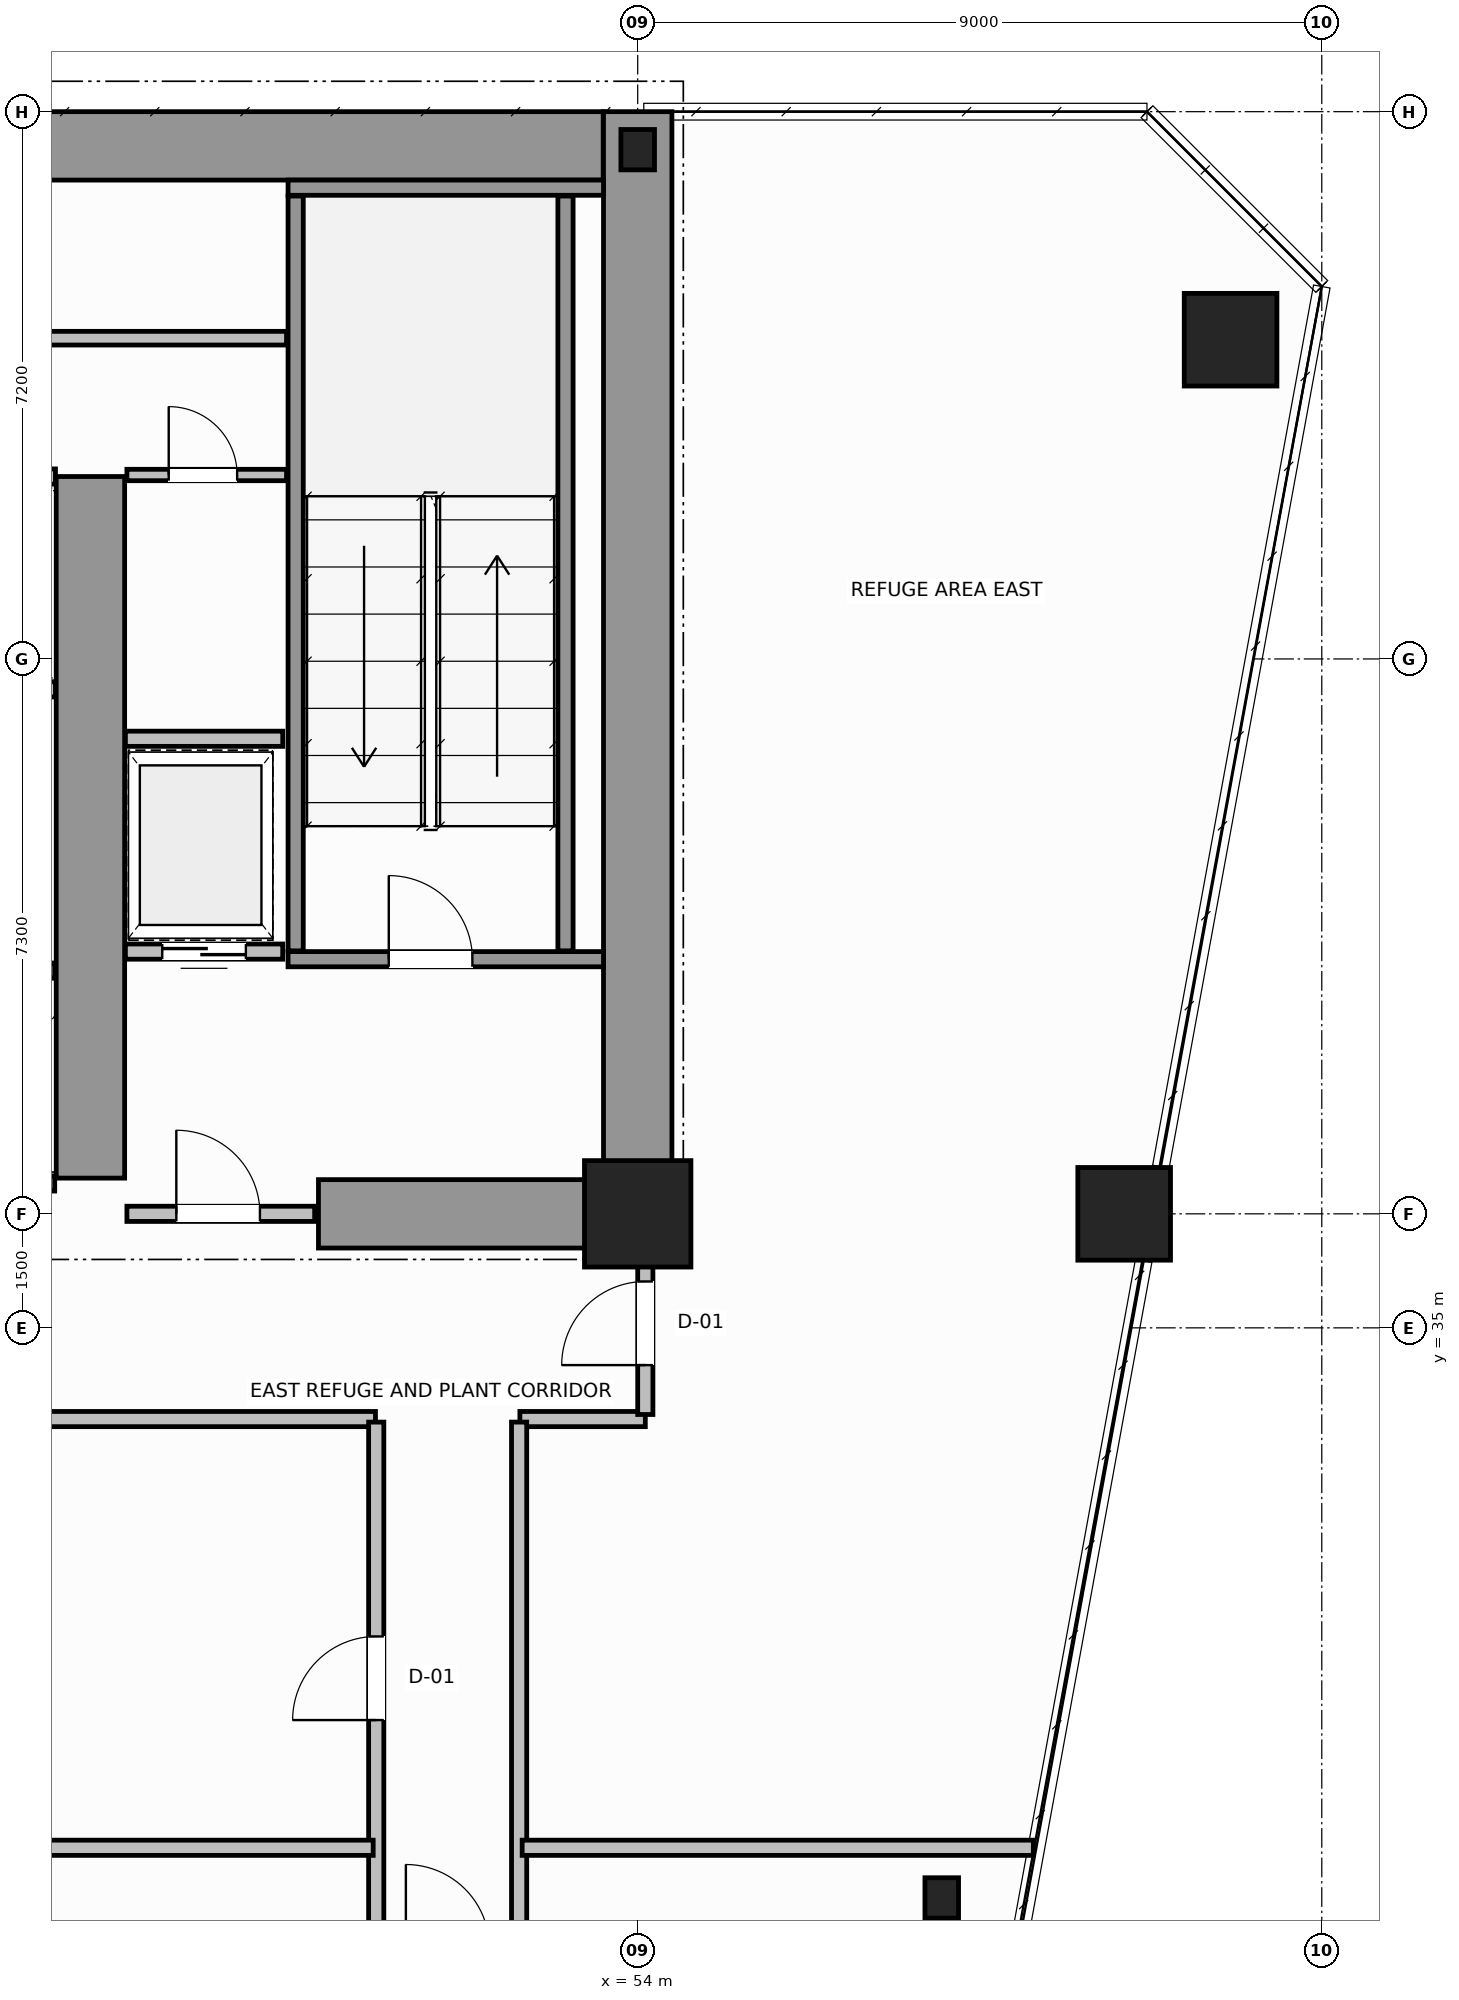
"""IFC4 building model, lengths in metres.
Left out: names, types, materials, properties, quantities, classifications, styles, units other than length and angle.
Written with IfcOpenShell. Run it as: python <this file> out.ifc"""

import sys

from ifc_helpers import new_model, si_unit, direction, frame, frame_2d, origin, origin_2d, place, context, subcontext, project, spatial, rectangle, hollow_circle, i_section, extrude, source, transform, mapped, element, fill, save


model = new_model("IFC4")
c1 = context("Model", 3, precision=1e-05, world=origin(), true_north=direction((0.0, 1.0)))
c2 = subcontext(c1, "Body", "Model", "MODEL_VIEW")
j1 = project(units=[si_unit("LENGTHUNIT", "METRE"), si_unit("PLANEANGLEUNIT", "RADIAN")], contexts=[c1])
p1 = place(None, origin())
s1 = spatial("IfcSite", under=j1, at=p1, CompositionType="ELEMENT")
p2 = place(p1, origin())
s2 = spatial("IfcBuilding", under=s1, at=p2, CompositionType="ELEMENT")
p3 = place(p2, frame((0.0, 0.0, 83.4)))
s3 = spatial("IfcBuildingStorey", under=s2, at=p3, CompositionType="ELEMENT", Elevation=83.4)
m1 = source(origin(), c2, "Body", "SweptSolid", [
    extrude(rectangle(XDim=1.4, YDim=1.4, at=origin_2d()), origin(), (0.0, 0.0, 1.0), 4.8),
])
p4 = place(p3, frame((54.0, 36.5, 0.0), z_axis=(0.0, 0.0, 1.0), x_axis=(1.0, 0.0, 0.0)))
e1 = element("IfcColumn", 1, at=p4, inside=s3, PredefinedType="COLUMN", context=c2, shape_type="MappedRepresentation", body=[
    mapped(m1, transform((0.0, 0.0, 0.0), scale=1.0)),
])
m2 = source(origin(), c2, "Body", "SweptSolid", [
    extrude(i_section(OverallWidth=0.442, OverallDepth=0.531, WebThickness=0.065, FlangeThickness=0.076, FilletRadius=0.015, at=origin_2d()), origin(), (0.0, 0.0, 1.0), 4.8),
])
p5 = place(p3, frame((54.0, 50.5, 0.0), z_axis=(0.0, 0.0, 1.0), x_axis=(1.0, 0.0, 0.0)))
e2 = element("IfcColumn", 2, at=p5, inside=s3, PredefinedType="COLUMN", context=c2, shape_type="MappedRepresentation", body=[
    mapped(m2, transform((0.0, 0.0, 0.0), scale=1.0)),
])
m3 = source(origin(), c2, "Body", "SweptSolid", [
    extrude(hollow_circle(Radius=0.61, WallThickness=0.05, at=origin_2d()), origin(), (0.0, 0.0, 1.0), 4.8),
])
for number, where, z_axis, x_axis in (
    (3, (61.8, 48.0, 0.0), (0.0, 0.0, 1.0), (1.0, 0.0, 0.0)),
    (4, (60.4, 36.5, 0.0), (0.0, 0.0, 1.0), (1.0, 0.0, 0.0)),
):
    element("IfcColumn", number, at=place(p3, frame(where, z_axis=z_axis, x_axis=x_axis)), inside=s3, PredefinedType="COLUMN", context=c2, shape_type="MappedRepresentation", body=[
        mapped(m3, transform((0.0, 0.0, 0.0), scale=1.0)),
    ])
m4 = source(origin(), c2, "Body", "SweptSolid", [
    extrude(i_section(OverallWidth=0.442, OverallDepth=0.531, WebThickness=0.065, FlangeThickness=0.076, FilletRadius=0.015, at=origin_2d()), origin(), (0.0, 0.0, 1.0), 4.8),
])
p6 = place(p3, frame((58.0, 27.5, 0.0), z_axis=(0.0, 0.0, 1.0), x_axis=(1.0, 0.0, 0.0)))
e5 = element("IfcColumn", 5, at=p6, inside=s3, PredefinedType="COLUMN", context=c2, shape_type="MappedRepresentation", body=[
    mapped(m4, transform((0.0, 0.0, 0.0), scale=1.0)),
])
p7 = place(p3, frame((34.002, 50.55, 0.0), z_axis=(0.0, 0.0, 1.0), x_axis=(1.0, 0.0, 0.0)))
e6 = element("IfcWall", 6, at=p7, inside=s3, PredefinedType="SHEAR", context=c2, shape_type="SweptSolid", body=[
    extrude(rectangle(XDim=19.544, YDim=0.9, at=frame_2d((9.772, 0.0))), origin(), (0.0, 0.0, 1.0), 4.8),
])
p8 = place(p3, frame((54.0, 36.5, 0.0), z_axis=(0.0, 0.0, 1.0), x_axis=(0.0, 1.0, 0.0)))
e7 = element("IfcWall", 7, at=p8, inside=s3, PredefinedType="SHEAR", context=c2, shape_type="SweptSolid", body=[
    extrude(rectangle(XDim=14.5, YDim=0.9, at=frame_2d((7.25, 0.0))), origin(), (0.0, 0.0, 1.0), 4.8),
])
p9 = place(p3, frame((49.8, 36.5, 0.0), z_axis=(0.0, 0.0, 1.0), x_axis=(1.0, 0.0, 0.0)))
e8 = element("IfcWall", 8, at=p9, inside=s3, PredefinedType="SHEAR", context=c2, shape_type="SweptSolid", body=[
    extrude(rectangle(XDim=3.73, YDim=0.9, at=frame_2d((1.865, 0.0))), origin(), (0.0, 0.0, 1.0), 3.34),
])
p10 = place(p3, frame((46.8, 36.97, 0.0), z_axis=(0.0, 0.0, 1.0), x_axis=(0.0, 1.0, 0.0)))
e9 = element("IfcWall", 9, at=p10, inside=s3, PredefinedType="SHEAR", context=c2, shape_type="SweptSolid", body=[
    extrude(rectangle(XDim=9.23, YDim=0.9, at=frame_2d((4.615, 0.0))), origin(), (0.0, 0.0, 1.0), 4.8),
])
p11 = place(p3, frame((49.4, 39.85, 0.0), z_axis=(0.0, 0.0, 1.0), x_axis=(1.0, 0.0, 0.0)))
e10 = element("IfcWall", 10, at=p11, inside=s3, PredefinedType="SOLIDWALL", context=c2, shape_type="SweptSolid", body=[
    extrude(rectangle(XDim=4.15, YDim=0.2, at=frame_2d((2.075, 0.0))), origin(), (0.0, 0.0, 1.0), 4.8),
])
p12 = place(p11, frame((1.325, 0.0, 0.0)))
e11 = element("IfcOpeningElement", 11, at=p12, cuts=e10, PredefinedType="OPENING", context=c2, shape_type="SweptSolid", body=[
    extrude(rectangle(XDim=1.1, YDim=2.15, at=frame_2d((0.55, 1.075))), frame((0.0, 0.11, 0.0), z_axis=(0.0, -1.0, 0.0), x_axis=(1.0, 0.0, 0.0)), (0.0, 0.0, 1.0), 0.22),
])
p13 = place(p3, frame((49.4, 50.0, 0.0), z_axis=(0.0, 0.0, 1.0), x_axis=(1.0, 0.0, 0.0)))
e12 = element("IfcWall", 12, at=p13, inside=s3, PredefinedType="SOLIDWALL", context=c2, shape_type="SweptSolid", body=[
    extrude(rectangle(XDim=4.15, YDim=0.2, at=frame_2d((2.075, 0.0))), origin(), (0.0, 0.0, 1.0), 4.8),
])
for number, where, z_axis, x_axis in (
    (13, (49.5, 39.96, 0.0), (0.0, 0.0, 1.0), (0.0, 1.0, 0.0)),
    (14, (53.05, 39.96, 0.0), (0.0, 0.0, 1.0), (0.0, 1.0, 0.0)),
):
    element("IfcWall", number, at=place(p3, frame(where, z_axis=z_axis, x_axis=x_axis)), inside=s3, PredefinedType="SOLIDWALL", context=c2, shape_type="SweptSolid", body=[
        extrude(rectangle(XDim=9.93, YDim=0.2, at=frame_2d((4.965, 0.0))), origin(), (0.0, 0.0, 1.0), 4.8),
    ])
p14 = place(p3, frame((47.28, 36.5, 0.0), z_axis=(0.0, 0.0, 1.0), x_axis=(1.0, 0.0, 0.0)))
e15 = element("IfcWall", 15, at=p14, inside=s3, PredefinedType="SOLIDWALL", context=c2, shape_type="SweptSolid", body=[
    extrude(rectangle(XDim=2.47, YDim=0.2, at=frame_2d((1.235, 0.0))), origin(), (0.0, 0.0, 1.0), 3.33),
])
p15 = place(p14, frame((0.65, 0.0, 0.0)))
e16 = element("IfcOpeningElement", 16, at=p15, cuts=e15, PredefinedType="OPENING", context=c2, shape_type="SweptSolid", body=[
    extrude(rectangle(XDim=1.1, YDim=2.15, at=frame_2d((0.55, 1.075))), frame((0.0, 0.11, 0.0), z_axis=(0.0, -1.0, 0.0), x_axis=(1.0, 0.0, 0.0)), (0.0, 0.0, 1.0), 0.22),
])
p16 = place(p3, frame((44.37, 39.7, 0.0), z_axis=(0.0, 0.0, 1.0), x_axis=(1.0, 0.0, 0.0)))
e17 = element("IfcWall", 17, at=p16, inside=s3, PredefinedType="SOLIDWALL", context=c2, shape_type="SweptSolid", body=[
    extrude(rectangle(XDim=1.96, YDim=0.2, at=frame_2d((0.98, 0.0))), origin(), (0.0, 0.0, 1.0), 4.54),
])
p17 = place(p3, frame((44.37, 36.9, 0.0), z_axis=(0.0, 0.0, 1.0), x_axis=(1.0, 0.0, 0.0)))
e18 = element("IfcWall", 18, at=p17, inside=s3, PredefinedType="SOLIDWALL", context=c2, shape_type="SweptSolid", body=[
    extrude(rectangle(XDim=1.96, YDim=0.2, at=frame_2d((0.98, 0.0))), origin(), (0.0, 0.0, 1.0), 3.33),
])
for number, where, z_axis, x_axis in (
    (19, (44.62, 43.4, 0.0), (0.0, 0.0, 1.0), (1.0, 0.0, 0.0)),
    (20, (44.62, 46.2, 0.0), (0.0, 0.0, 1.0), (1.0, 0.0, 0.0)),
):
    element("IfcWall", number, at=place(p3, frame(where, z_axis=z_axis, x_axis=x_axis)), inside=s3, PredefinedType="SOLIDWALL", context=c2, shape_type="SweptSolid", body=[
        extrude(rectangle(XDim=1.72, YDim=0.2, at=frame_2d((0.86, 0.0))), origin(), (0.0, 0.0, 1.0), 4.54),
    ])
p18 = place(p3, frame((47.26, 39.95, 0.0), z_axis=(0.0, 0.0, 1.0), x_axis=(1.0, 0.0, 0.0)))
e21 = element("IfcWall", 21, at=p18, inside=s3, PredefinedType="SOLIDWALL", context=c2, shape_type="SweptSolid", body=[
    extrude(rectangle(XDim=2.07, YDim=0.2, at=frame_2d((1.035, 0.0))), origin(), (0.0, 0.0, 1.0), 4.54),
])
p19 = place(p18, frame((0.485, 0.0, 0.0)))
e22 = element("IfcOpeningElement", 22, at=p19, cuts=e21, PredefinedType="OPENING", context=c2, shape_type="SweptSolid", body=[
    extrude(rectangle(XDim=1.1, YDim=2.15, at=frame_2d((0.55, 1.075))), frame((0.0, 0.11, 0.0), z_axis=(0.0, -1.0, 0.0), x_axis=(1.0, 0.0, 0.0)), (0.0, 0.0, 1.0), 0.22),
])
p20 = place(p3, frame((47.26, 42.75, 0.0), z_axis=(0.0, 0.0, 1.0), x_axis=(1.0, 0.0, 0.0)))
e23 = element("IfcWall", 23, at=p20, inside=s3, PredefinedType="SOLIDWALL", context=c2, shape_type="SweptSolid", body=[
    extrude(rectangle(XDim=2.07, YDim=0.2, at=frame_2d((1.035, 0.0))), origin(), (0.0, 0.0, 1.0), 4.54),
])
p21 = place(p3, frame((47.28, 46.22, 0.0), z_axis=(0.0, 0.0, 1.0), x_axis=(1.0, 0.0, 0.0)))
e24 = element("IfcWall", 24, at=p21, inside=s3, PredefinedType="PARTITIONING", context=c2, shape_type="SweptSolid", body=[
    extrude(rectangle(XDim=2.1, YDim=0.15, at=frame_2d((1.05, 0.0))), origin(), (0.0, 0.0, 1.0), 4.54),
])
p22 = place(p21, frame((0.55, 0.0, 0.0)))
e25 = element("IfcOpeningElement", 25, at=p22, cuts=e24, PredefinedType="OPENING", context=c2, shape_type="SweptSolid", body=[
    extrude(rectangle(XDim=0.9, YDim=2.1, at=frame_2d((0.45, 1.05))), frame((0.0, 0.085, 0.0), z_axis=(0.0, -1.0, 0.0), x_axis=(1.0, 0.0, 0.0)), (0.0, 0.0, 1.0), 0.17),
])
p23 = place(p3, frame((18.62, 48.02, 0.0), z_axis=(0.0, 0.0, 1.0), x_axis=(1.0, 0.0, 0.0)))
e26 = element("IfcWall", 26, at=p23, inside=s3, PredefinedType="PLUMBINGWALL", context=c2, shape_type="SweptSolid", body=[
    extrude(rectangle(XDim=30.76, YDim=0.18, at=frame_2d((15.38, 0.0))), origin(), (0.0, 0.0, 1.0), 4.54),
])
p24 = place(p23, frame((1.955, 0.0, 0.0)))
e27 = element("IfcOpeningElement", 27, at=p24, cuts=e26, PredefinedType="OPENING", context=c2, shape_type="SweptSolid", body=[
    extrude(rectangle(XDim=0.9, YDim=2.15, at=frame_2d((0.45, 1.075))), frame((0.0, 0.1, 0.0), z_axis=(0.0, -1.0, 0.0), x_axis=(1.0, 0.0, 0.0)), (0.0, 0.0, 1.0), 0.2),
])
p25 = place(p23, frame((8.03, 0.0, 0.0)))
e28 = element("IfcOpeningElement", 28, at=p25, cuts=e26, PredefinedType="OPENING", context=c2, shape_type="SweptSolid", body=[
    extrude(rectangle(XDim=0.9, YDim=2.15, at=frame_2d((0.45, 1.075))), frame((0.0, 0.1, 0.0), z_axis=(0.0, -1.0, 0.0), x_axis=(1.0, 0.0, 0.0)), (0.0, 0.0, 1.0), 0.2),
])
p26 = place(p23, frame((16.93, 0.0, 0.0)))
e29 = element("IfcOpeningElement", 29, at=p26, cuts=e26, PredefinedType="OPENING", context=c2, shape_type="SweptSolid", body=[
    extrude(rectangle(XDim=0.9, YDim=2.15, at=frame_2d((0.45, 1.075))), frame((0.0, 0.1, 0.0), z_axis=(0.0, -1.0, 0.0), x_axis=(1.0, 0.0, 0.0)), (0.0, 0.0, 1.0), 0.2),
])
p27 = place(p23, frame((26.205, 0.0, 0.0)))
e30 = element("IfcOpeningElement", 30, at=p27, cuts=e26, PredefinedType="OPENING", context=c2, shape_type="SweptSolid", body=[
    extrude(rectangle(XDim=0.9, YDim=2.15, at=frame_2d((0.45, 1.075))), frame((0.0, 0.1, 0.0), z_axis=(0.0, -1.0, 0.0), x_axis=(1.0, 0.0, 0.0)), (0.0, 0.0, 1.0), 0.2),
])
p28 = place(p3, frame((39.64, 33.8, 0.0), z_axis=(0.0, 0.0, 1.0), x_axis=(1.0, 0.0, 0.0)))
e31 = element("IfcWall", 31, at=p28, inside=s3, PredefinedType="SOLIDWALL", context=c2, shape_type="SweptSolid", body=[
    extrude(rectangle(XDim=10.91, YDim=0.2, at=frame_2d((5.455, 0.0))), origin(), (0.0, 0.0, 1.0), 4.03),
])
p29 = place(p28, frame((1.8, 0.0, 0.0)))
e32 = element("IfcOpeningElement", 32, at=p29, cuts=e31, PredefinedType="OPENING", context=c2, shape_type="SweptSolid", body=[
    extrude(rectangle(XDim=1.1, YDim=2.15, at=frame_2d((0.55, 1.075))), frame((0.0, 0.11, 0.0), z_axis=(0.0, -1.0, 0.0), x_axis=(1.0, 0.0, 0.0)), (0.0, 0.0, 1.0), 0.22),
])
p30 = place(p3, frame((52.45, 33.8, 0.0), z_axis=(0.0, 0.0, 1.0), x_axis=(1.0, 0.0, 0.0)))
e33 = element("IfcWall", 33, at=p30, inside=s3, PredefinedType="SOLIDWALL", context=c2, shape_type="SweptSolid", body=[
    extrude(rectangle(XDim=1.65, YDim=0.2, at=frame_2d((0.825, 0.0))), origin(), (0.0, 0.0, 1.0), 4.03),
])
p31 = place(p3, frame((54.1, 33.86, 0.0), z_axis=(0.0, 0.0, 1.0), x_axis=(0.0, 1.0, 0.0)))
e34 = element("IfcWall", 34, at=p31, inside=s3, PredefinedType="SOLIDWALL", context=c2, shape_type="SweptSolid", body=[
    extrude(rectangle(XDim=2.58, YDim=0.2, at=frame_2d((1.29, 0.0))), origin(), (0.0, 0.0, 1.0), 4.54),
])
p32 = place(p31, frame((0.65, 0.0, 0.0)))
e35 = element("IfcOpeningElement", 35, at=p32, cuts=e34, PredefinedType="OPENING", context=c2, shape_type="SweptSolid", body=[
    extrude(rectangle(XDim=1.1, YDim=2.15, at=frame_2d((0.55, 1.075))), frame((0.0, 0.11, 0.0), z_axis=(0.0, -1.0, 0.0), x_axis=(1.0, 0.0, 0.0)), (0.0, 0.0, 1.0), 0.22),
])
p33 = place(p3, frame((50.56, 26.84, 0.0), z_axis=(0.0, 0.0, 1.0), x_axis=(0.0, 1.0, 0.0)))
e36 = element("IfcWall", 36, at=p33, inside=s3, PredefinedType="SOLIDWALL", context=c2, shape_type="SweptSolid", body=[
    extrude(rectangle(XDim=6.92, YDim=0.2, at=frame_2d((3.46, 0.0))), origin(), (0.0, 0.0, 1.0), 4.54),
])
p34 = place(p33, frame((3.0, 0.0, 0.0)))
e37 = element("IfcOpeningElement", 37, at=p34, cuts=e36, PredefinedType="OPENING", context=c2, shape_type="SweptSolid", body=[
    extrude(rectangle(XDim=1.1, YDim=2.15, at=frame_2d((0.55, 1.075))), frame((0.0, 0.11, 0.0), z_axis=(0.0, -1.0, 0.0), x_axis=(1.0, 0.0, 0.0)), (0.0, 0.0, 1.0), 0.22),
])
p35 = place(p3, frame((52.44, 26.84, 0.0), z_axis=(0.0, 0.0, 1.0), x_axis=(0.0, 1.0, 0.0)))
e38 = element("IfcWall", 38, at=p35, inside=s3, PredefinedType="SOLIDWALL", context=c2, shape_type="SweptSolid", body=[
    extrude(rectangle(XDim=6.92, YDim=0.2, at=frame_2d((3.46, 0.0))), origin(), (0.0, 0.0, 1.0), 4.54),
])
p36 = place(p3, frame((17.48, 28.16, 0.0), z_axis=(0.0, 0.0, 1.0), x_axis=(1.0, 0.0, 0.0)))
e39 = element("IfcWall", 39, at=p36, inside=s3, PredefinedType="SOLIDWALL", context=c2, shape_type="SweptSolid", body=[
    extrude(rectangle(XDim=33.04, YDim=0.2, at=frame_2d((16.52, 0.0))), origin(), (0.0, 0.0, 1.0), 4.54),
])
p37 = place(p3, frame((52.48, 28.16, 0.0), z_axis=(0.0, 0.0, 1.0), x_axis=(1.0, 0.0, 0.0)))
e40 = element("IfcWall", 40, at=p37, inside=s3, PredefinedType="SOLIDWALL", context=c2, shape_type="SweptSolid", body=[
    extrude(rectangle(XDim=6.725, YDim=0.2, at=frame_2d((3.362, 0.0))), origin(), (0.0, 0.0, 1.0), 4.54),
])
m5 = source(origin(), c2, "Body", "SweptSolid", [
    extrude(rectangle(XDim=1.1, YDim=2.15, at=frame_2d((0.55, 1.075))), frame((0.0, 0.025, 0.0), z_axis=(0.0, -1.0, 0.0), x_axis=(1.0, 0.0, 0.0)), (0.0, 0.0, 1.0), 0.05),
])
p38 = place(p12, origin())
e41 = element("IfcDoor", 41, at=p38, inside=s3, OperationType="SINGLE_SWING_RIGHT", PredefinedType="DOOR", context=c2, shape_type="MappedRepresentation", body=[
    mapped(m5, transform((0.0, 0.0, 0.0), scale=1.0)),
])
fill(e11, e41)
p39 = place(p15, origin())
e42 = element("IfcDoor", 42, at=p39, inside=s3, OperationType="SINGLE_SWING_LEFT", PredefinedType="DOOR", context=c2, shape_type="MappedRepresentation", body=[
    mapped(m5, transform((0.0, 0.0, 0.0), scale=1.0)),
])
fill(e16, e42)
p40 = place(p19, origin())
e43 = element("IfcDoor", 43, at=p40, inside=s3, OperationType="DOUBLE_DOOR_SLIDING", PredefinedType="DOOR", context=c2, shape_type="MappedRepresentation", body=[
    mapped(m5, transform((0.0, 0.0, 0.0), scale=1.0)),
])
fill(e22, e43)
m6 = source(origin(), c2, "Body", "SweptSolid", [
    extrude(rectangle(XDim=0.9, YDim=2.1, at=frame_2d((0.45, 1.05))), frame((0.0, 0.025, 0.0), z_axis=(0.0, -1.0, 0.0), x_axis=(1.0, 0.0, 0.0)), (0.0, 0.0, 1.0), 0.05),
])
p41 = place(p22, origin())
e44 = element("IfcDoor", 44, at=p41, inside=s3, OperationType="SINGLE_SWING_RIGHT", PredefinedType="DOOR", context=c2, shape_type="MappedRepresentation", body=[
    mapped(m6, transform((0.0, 0.0, 0.0), scale=1.0)),
])
fill(e25, e44)
p42 = place(p32, origin())
e45 = element("IfcDoor", 45, at=p42, inside=s3, OperationType="SINGLE_SWING_RIGHT", PredefinedType="DOOR", context=c2, shape_type="MappedRepresentation", body=[
    mapped(m5, transform((0.0, 0.0, 0.0), scale=1.0)),
])
fill(e35, e45)
p43 = place(p34, origin())
e46 = element("IfcDoor", 46, at=p43, inside=s3, OperationType="SINGLE_SWING_LEFT", PredefinedType="DOOR", context=c2, shape_type="MappedRepresentation", body=[
    mapped(m5, transform((0.0, 0.0, 0.0), scale=1.0)),
])
fill(e37, e46)
save(model, sys.argv[1])
